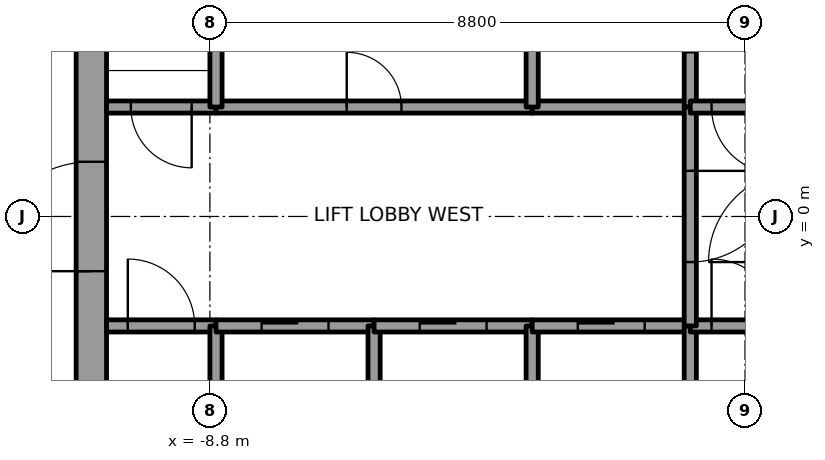
"""IFC4 building model, lengths in metres.
Left out: names, types, materials, properties, quantities, classifications, styles, units other than length and angle.
Written with IfcOpenShell. Run it as: python <this file> out.ifc"""

import sys

from ifc_helpers import new_model, si_unit, direction, frame, frame_2d, origin, place, context, subcontext, project, spatial, rectangle, extrude, element, fill, save


model = new_model("IFC4")
c1 = context("Model", 3, precision=1e-05, world=origin(), true_north=direction((0.0, 1.0)))
c2 = subcontext(c1, "Body", "Model", "MODEL_VIEW")
j1 = project(units=[si_unit("LENGTHUNIT", "METRE"), si_unit("PLANEANGLEUNIT", "RADIAN")], contexts=[c1])
p1 = place(None, origin())
s1 = spatial("IfcSite", under=j1, at=p1, CompositionType="ELEMENT")
p2 = place(p1, origin())
s2 = spatial("IfcBuilding", under=s1, at=p2, CompositionType="ELEMENT")
p3 = place(p2, frame((0.0, 0.0, 287.0)))
s3 = spatial("IfcBuildingStorey", under=s2, at=p3, CompositionType="ELEMENT", Elevation=287.0)
p4 = place(p3, frame((-10.75, -7.5, 0.0), z_axis=(0.0, 0.0, 1.0), x_axis=(0.0, 1.0, 0.0)))
e1 = element("IfcWall", 1, at=p4, inside=s3, PredefinedType="SHEAR", context=c2, shape_type="SweptSolid", body=[
    extrude(rectangle(XDim=15.0, YDim=0.5, at=frame_2d((7.5, 0.0))), origin(), (0.0, 0.0, 1.0), 4.0),
])
p5 = place(p4, frame((6.6, 0.0, 0.0)))
e2 = element("IfcOpeningElement", 2, at=p5, cuts=e1, PredefinedType="OPENING", context=c2, shape_type="SweptSolid", body=[
    extrude(rectangle(XDim=1.8, YDim=2.1, at=frame_2d((0.9, 1.05))), frame((0.0, 0.25, 0.0), z_axis=(0.0, -1.0, 0.0), x_axis=(1.0, 0.0, 0.0)), (0.0, 0.0, 1.0), 0.5),
])
p6 = place(p3, frame((-10.5, -1.8, 0.0), z_axis=(0.0, 0.0, 1.0), x_axis=(1.0, 0.0, 0.0)))
e3 = element("IfcWall", 3, at=p6, inside=s3, PredefinedType="SOLIDWALL", context=c2, shape_type="SweptSolid", body=[
    extrude(rectangle(XDim=1.8, YDim=0.2, at=frame_2d((0.9, 0.0))), origin(), (0.0, 0.0, 1.0), 3.85),
])
p7 = place(p6, frame((0.35, 0.0, 0.0)))
e4 = element("IfcOpeningElement", 4, at=p7, cuts=e3, PredefinedType="OPENING", context=c2, shape_type="SweptSolid", body=[
    extrude(rectangle(XDim=1.1, YDim=2.1, at=frame_2d((0.55, 1.05))), frame((0.0, 0.1, 0.0), z_axis=(0.0, -1.0, 0.0), x_axis=(1.0, 0.0, 0.0)), (0.0, 0.0, 1.0), 0.2),
])
p8 = place(p3, frame((-8.7, 1.8, 0.0), z_axis=(0.0, 0.0, 1.0), x_axis=(-1.0, 0.0, 0.0)))
e5 = element("IfcWall", 5, at=p8, inside=s3, PredefinedType="SOLIDWALL", context=c2, shape_type="SweptSolid", body=[
    extrude(rectangle(XDim=1.8, YDim=0.2, at=frame_2d((0.9, 0.0))), origin(), (0.0, 0.0, 1.0), 3.85),
])
p9 = place(p8, frame((0.4, 0.0, 0.0)))
e6 = element("IfcOpeningElement", 6, at=p9, cuts=e5, PredefinedType="OPENING", context=c2, shape_type="SweptSolid", body=[
    extrude(rectangle(XDim=1.0, YDim=2.1, at=frame_2d((0.5, 1.05))), frame((0.0, 0.1, 0.0), z_axis=(0.0, -1.0, 0.0), x_axis=(1.0, 0.0, 0.0)), (0.0, 0.0, 1.0), 0.2),
])
p10 = place(p3, frame((-8.7, -4.6, 0.0), z_axis=(0.0, 0.0, 1.0), x_axis=(0.0, 1.0, 0.0)))
e7 = element("IfcWall", 7, at=p10, inside=s3, PredefinedType="SOLIDWALL", context=c2, shape_type="SweptSolid", body=[
    extrude(rectangle(XDim=2.8, YDim=0.2, at=frame_2d((1.4, 0.0))), origin(), (0.0, 0.0, 1.0), 3.85),
])
p11 = place(p3, frame((-8.7, -1.8, 0.0), z_axis=(0.0, 0.0, 1.0), x_axis=(1.0, 0.0, 0.0)))
e8 = element("IfcWall", 8, at=p11, inside=s3, PredefinedType="SOLIDWALL", context=c2, shape_type="SweptSolid", body=[
    extrude(rectangle(XDim=2.6, YDim=0.2, at=frame_2d((1.3, 0.0))), origin(), (0.0, 0.0, 1.0), 3.85),
])
p12 = place(p11, frame((0.75, 0.0, 0.0)))
e9 = element("IfcOpeningElement", 9, at=p12, cuts=e8, PredefinedType="OPENING", context=c2, shape_type="SweptSolid", body=[
    extrude(rectangle(XDim=1.1, YDim=2.1, at=frame_2d((0.55, 1.05))), frame((0.0, 0.1, 0.0), z_axis=(0.0, -1.0, 0.0), x_axis=(1.0, 0.0, 0.0)), (0.0, 0.0, 1.0), 0.2),
])
p13 = place(p3, frame((-8.7, 1.8, 0.0), z_axis=(0.0, 0.0, 1.0), x_axis=(1.0, 0.0, 0.0)))
e10 = element("IfcWall", 10, at=p13, inside=s3, PredefinedType="SOLIDWALL", context=c2, shape_type="SweptSolid", body=[
    extrude(rectangle(XDim=5.2, YDim=0.2, at=frame_2d((2.6, 0.0))), origin(), (0.0, 0.0, 1.0), 3.85),
])
p14 = place(p13, frame((2.15, 0.0, 0.0)))
e11 = element("IfcOpeningElement", 11, at=p14, cuts=e10, PredefinedType="OPENING", context=c2, shape_type="SweptSolid", body=[
    extrude(rectangle(XDim=0.9, YDim=2.1, at=frame_2d((0.45, 1.05))), frame((0.0, 0.1, 0.0), z_axis=(0.0, -1.0, 0.0), x_axis=(1.0, 0.0, 0.0)), (0.0, 0.0, 1.0), 0.2),
])
for number, where, z_axis, x_axis in (
    (12, (-8.7, 4.6, 0.0), (0.0, 0.0, 1.0), (0.0, -1.0, 0.0)),
    (13, (-6.1, -4.6, 0.0), (0.0, 0.0, 1.0), (0.0, 1.0, 0.0)),
):
    element("IfcWall", number, at=place(p3, frame(where, z_axis=z_axis, x_axis=x_axis)), inside=s3, PredefinedType="SOLIDWALL", context=c2, shape_type="SweptSolid", body=[
        extrude(rectangle(XDim=2.8, YDim=0.2, at=frame_2d((1.4, 0.0))), origin(), (0.0, 0.0, 1.0), 3.85),
    ])
p15 = place(p3, frame((-6.1, -1.8, 0.0), z_axis=(0.0, 0.0, 1.0), x_axis=(1.0, 0.0, 0.0)))
e14 = element("IfcWall", 14, at=p15, inside=s3, PredefinedType="SOLIDWALL", context=c2, shape_type="SweptSolid", body=[
    extrude(rectangle(XDim=2.6, YDim=0.2, at=frame_2d((1.3, 0.0))), origin(), (0.0, 0.0, 1.0), 3.85),
])
p16 = place(p15, frame((0.75, 0.0, 0.0)))
e15 = element("IfcOpeningElement", 15, at=p16, cuts=e14, PredefinedType="OPENING", context=c2, shape_type="SweptSolid", body=[
    extrude(rectangle(XDim=1.1, YDim=2.1, at=frame_2d((0.55, 1.05))), frame((0.0, 0.1, 0.0), z_axis=(0.0, -1.0, 0.0), x_axis=(1.0, 0.0, 0.0)), (0.0, 0.0, 1.0), 0.2),
])
p17 = place(p3, frame((-3.5, -4.6, 0.0), z_axis=(0.0, 0.0, 1.0), x_axis=(0.0, 1.0, 0.0)))
e16 = element("IfcWall", 16, at=p17, inside=s3, PredefinedType="SOLIDWALL", context=c2, shape_type="SweptSolid", body=[
    extrude(rectangle(XDim=2.8, YDim=0.2, at=frame_2d((1.4, 0.0))), origin(), (0.0, 0.0, 1.0), 3.85),
])
p18 = place(p3, frame((-3.5, -1.8, 0.0), z_axis=(0.0, 0.0, 1.0), x_axis=(1.0, 0.0, 0.0)))
e17 = element("IfcWall", 17, at=p18, inside=s3, PredefinedType="SOLIDWALL", context=c2, shape_type="SweptSolid", body=[
    extrude(rectangle(XDim=2.6, YDim=0.2, at=frame_2d((1.3, 0.0))), origin(), (0.0, 0.0, 1.0), 3.85),
])
p19 = place(p18, frame((0.75, 0.0, 0.0)))
e18 = element("IfcOpeningElement", 18, at=p19, cuts=e17, PredefinedType="OPENING", context=c2, shape_type="SweptSolid", body=[
    extrude(rectangle(XDim=1.1, YDim=2.1, at=frame_2d((0.55, 1.05))), frame((0.0, 0.1, 0.0), z_axis=(0.0, -1.0, 0.0), x_axis=(1.0, 0.0, 0.0)), (0.0, 0.0, 1.0), 0.2),
])
p20 = place(p3, frame((-0.9, 1.8, 0.0), z_axis=(0.0, 0.0, 1.0), x_axis=(-1.0, 0.0, 0.0)))
e19 = element("IfcWall", 19, at=p20, inside=s3, PredefinedType="SOLIDWALL", context=c2, shape_type="SweptSolid", body=[
    extrude(rectangle(XDim=2.6, YDim=0.2, at=frame_2d((1.3, 0.0))), origin(), (0.0, 0.0, 1.0), 3.85),
])
p21 = place(p3, frame((-3.5, 1.8, 0.0), z_axis=(0.0, 0.0, 1.0), x_axis=(0.0, 1.0, 0.0)))
e20 = element("IfcWall", 20, at=p21, inside=s3, PredefinedType="SOLIDWALL", context=c2, shape_type="SweptSolid", body=[
    extrude(rectangle(XDim=2.8, YDim=0.2, at=frame_2d((1.4, 0.0))), origin(), (0.0, 0.0, 1.0), 3.85),
])
p22 = place(p3, frame((-0.9, 1.8, 0.0), z_axis=(0.0, 0.0, 1.0), x_axis=(0.0, 1.0, 0.0)))
e21 = element("IfcWall", 21, at=p22, inside=s3, PredefinedType="SOLIDWALL", context=c2, shape_type="SweptSolid", body=[
    extrude(rectangle(XDim=3.0, YDim=0.2, at=frame_2d((1.5, 0.0))), origin(), (0.0, 0.0, 1.0), 3.85),
])
p23 = place(p22, frame((0.9, 0.0, 0.0)))
e22 = element("IfcOpeningElement", 22, at=p23, cuts=e21, PredefinedType="OPENING", context=c2, shape_type="SweptSolid", body=[
    extrude(rectangle(XDim=1.2, YDim=2.1, at=frame_2d((0.6, 1.05))), frame((0.0, 0.1, 0.0), z_axis=(0.0, -1.0, 0.0), x_axis=(1.0, 0.0, 0.0)), (0.0, 0.0, 1.0), 0.2),
])
p24 = place(p3, frame((-0.9, -4.6, 0.0), z_axis=(0.0, 0.0, 1.0), x_axis=(0.0, 1.0, 0.0)))
e23 = element("IfcWall", 23, at=p24, inside=s3, PredefinedType="SOLIDWALL", context=c2, shape_type="SweptSolid", body=[
    extrude(rectangle(XDim=2.8, YDim=0.2, at=frame_2d((1.4, 0.0))), origin(), (0.0, 0.0, 1.0), 3.85),
])
p25 = place(p3, frame((-0.9, -1.8, 0.0), z_axis=(0.0, 0.0, 1.0), x_axis=(1.0, 0.0, 0.0)))
e24 = element("IfcWall", 24, at=p25, inside=s3, PredefinedType="SOLIDWALL", context=c2, shape_type="SweptSolid", body=[
    extrude(rectangle(XDim=1.8, YDim=0.2, at=frame_2d((0.9, 0.0))), origin(), (0.0, 0.0, 1.0), 3.85),
])
p26 = place(p25, frame((0.35, 0.0, 0.0)))
e25 = element("IfcOpeningElement", 25, at=p26, cuts=e24, PredefinedType="OPENING", context=c2, shape_type="SweptSolid", body=[
    extrude(rectangle(XDim=1.1, YDim=2.1, at=frame_2d((0.55, 1.05))), frame((0.0, 0.1, 0.0), z_axis=(0.0, -1.0, 0.0), x_axis=(1.0, 0.0, 0.0)), (0.0, 0.0, 1.0), 0.2),
])
p27 = place(p3, frame((-0.9, 1.8, 0.0), z_axis=(0.0, 0.0, 1.0), x_axis=(0.0, -1.0, 0.0)))
e26 = element("IfcWall", 26, at=p27, inside=s3, PredefinedType="SOLIDWALL", context=c2, shape_type="SweptSolid", body=[
    extrude(rectangle(XDim=3.6, YDim=0.2, at=frame_2d((1.8, 0.0))), origin(), (0.0, 0.0, 1.0), 3.85),
])
p28 = place(p27, frame((1.05, 0.0, 0.0)))
e27 = element("IfcOpeningElement", 27, at=p28, cuts=e26, PredefinedType="OPENING", context=c2, shape_type="SweptSolid", body=[
    extrude(rectangle(XDim=1.5, YDim=2.1, at=frame_2d((0.75, 1.05))), frame((0.0, 0.1, 0.0), z_axis=(0.0, -1.0, 0.0), x_axis=(1.0, 0.0, 0.0)), (0.0, 0.0, 1.0), 0.2),
])
p29 = place(p3, frame((0.9, 1.8, 0.0), z_axis=(0.0, 0.0, 1.0), x_axis=(-1.0, 0.0, 0.0)))
e28 = element("IfcWall", 28, at=p29, inside=s3, PredefinedType="SOLIDWALL", context=c2, shape_type="SweptSolid", body=[
    extrude(rectangle(XDim=1.8, YDim=0.2, at=frame_2d((0.9, 0.0))), origin(), (0.0, 0.0, 1.0), 3.85),
])
p30 = place(p29, frame((0.35, 0.0, 0.0)))
e29 = element("IfcOpeningElement", 29, at=p30, cuts=e28, PredefinedType="OPENING", context=c2, shape_type="SweptSolid", body=[
    extrude(rectangle(XDim=1.1, YDim=2.1, at=frame_2d((0.55, 1.05))), frame((0.0, 0.1, 0.0), z_axis=(0.0, -1.0, 0.0), x_axis=(1.0, 0.0, 0.0)), (0.0, 0.0, 1.0), 0.2),
])
p31 = place(p12, origin())
e30 = element("IfcDoor", 30, at=p31, inside=s3, OperationType="SLIDING_TO_LEFT", PredefinedType="DOOR", context=c2, shape_type="SweptSolid", body=[
    extrude(rectangle(XDim=1.1, YDim=2.1, at=frame_2d((0.55, 1.05))), frame((0.0, 0.025, 0.0), z_axis=(0.0, -1.0, 0.0), x_axis=(1.0, 0.0, 0.0)), (0.0, 0.0, 1.0), 0.05),
])
fill(e9, e30)
p32 = place(p16, origin())
e31 = element("IfcDoor", 31, at=p32, inside=s3, OperationType="SLIDING_TO_LEFT", PredefinedType="DOOR", context=c2, shape_type="SweptSolid", body=[
    extrude(rectangle(XDim=1.1, YDim=2.1, at=frame_2d((0.55, 1.05))), frame((0.0, 0.025, 0.0), z_axis=(0.0, -1.0, 0.0), x_axis=(1.0, 0.0, 0.0)), (0.0, 0.0, 1.0), 0.05),
])
fill(e15, e31)
p33 = place(p19, origin())
e32 = element("IfcDoor", 32, at=p33, inside=s3, OperationType="SLIDING_TO_LEFT", PredefinedType="DOOR", context=c2, shape_type="SweptSolid", body=[
    extrude(rectangle(XDim=1.1, YDim=2.1, at=frame_2d((0.55, 1.05))), frame((0.0, 0.025, 0.0), z_axis=(0.0, -1.0, 0.0), x_axis=(1.0, 0.0, 0.0)), (0.0, 0.0, 1.0), 0.05),
])
fill(e18, e32)
p34 = place(p28, origin())
e33 = element("IfcDoor", 33, at=p34, inside=s3, OperationType="DOUBLE_DOOR_SINGLE_SWING", PredefinedType="DOOR", context=c2, shape_type="SweptSolid", body=[
    extrude(rectangle(XDim=1.5, YDim=2.1, at=frame_2d((0.75, 1.05))), frame((0.0, 0.025, 0.0), z_axis=(0.0, -1.0, 0.0), x_axis=(1.0, 0.0, 0.0)), (0.0, 0.0, 1.0), 0.05),
])
fill(e27, e33)
p35 = place(p7, origin())
e34 = element("IfcDoor", 34, at=p35, inside=s3, OperationType="SINGLE_SWING_RIGHT", PredefinedType="DOOR", context=c2, shape_type="SweptSolid", body=[
    extrude(rectangle(XDim=1.1, YDim=2.1, at=frame_2d((0.55, 1.05))), frame((0.0, 0.025, 0.0), z_axis=(0.0, -1.0, 0.0), x_axis=(1.0, 0.0, 0.0)), (0.0, 0.0, 1.0), 0.05),
])
fill(e4, e34)
p36 = place(p30, origin())
e35 = element("IfcDoor", 35, at=p36, inside=s3, OperationType="SINGLE_SWING_LEFT", PredefinedType="DOOR", context=c2, shape_type="SweptSolid", body=[
    extrude(rectangle(XDim=1.1, YDim=2.1, at=frame_2d((0.55, 1.05))), frame((0.0, 0.025, 0.0), z_axis=(0.0, -1.0, 0.0), x_axis=(1.0, 0.0, 0.0)), (0.0, 0.0, 1.0), 0.05),
])
fill(e29, e35)
p37 = place(p26, origin())
e36 = element("IfcDoor", 36, at=p37, inside=s3, OperationType="SINGLE_SWING_RIGHT", PredefinedType="DOOR", context=c2, shape_type="SweptSolid", body=[
    extrude(rectangle(XDim=1.1, YDim=2.1, at=frame_2d((0.55, 1.05))), frame((0.0, 0.025, 0.0), z_axis=(0.0, -1.0, 0.0), x_axis=(1.0, 0.0, 0.0)), (0.0, 0.0, 1.0), 0.05),
])
fill(e25, e36)
p38 = place(p9, origin())
e37 = element("IfcDoor", 37, at=p38, inside=s3, OperationType="SINGLE_SWING_RIGHT", PredefinedType="DOOR", context=c2, shape_type="SweptSolid", body=[
    extrude(rectangle(XDim=1.0, YDim=2.1, at=frame_2d((0.5, 1.05))), frame((0.0, 0.025, 0.0), z_axis=(0.0, -1.0, 0.0), x_axis=(1.0, 0.0, 0.0)), (0.0, 0.0, 1.0), 0.05),
])
fill(e6, e37)
p39 = place(p14, origin())
e38 = element("IfcDoor", 38, at=p39, inside=s3, OperationType="SINGLE_SWING_LEFT", PredefinedType="DOOR", context=c2, shape_type="SweptSolid", body=[
    extrude(rectangle(XDim=0.9, YDim=2.1, at=frame_2d((0.45, 1.05))), frame((0.0, 0.025, 0.0), z_axis=(0.0, -1.0, 0.0), x_axis=(1.0, 0.0, 0.0)), (0.0, 0.0, 1.0), 0.05),
])
fill(e11, e38)
p40 = place(p5, origin())
e39 = element("IfcDoor", 39, at=p40, inside=s3, OperationType="DOUBLE_DOOR_SINGLE_SWING", PredefinedType="DOOR", context=c2, shape_type="SweptSolid", body=[
    extrude(rectangle(XDim=1.8, YDim=2.1, at=frame_2d((0.9, 1.05))), frame((0.0, 0.025, 0.0), z_axis=(0.0, -1.0, 0.0), x_axis=(1.0, 0.0, 0.0)), (0.0, 0.0, 1.0), 0.05),
])
fill(e2, e39)
save(model, sys.argv[1])
